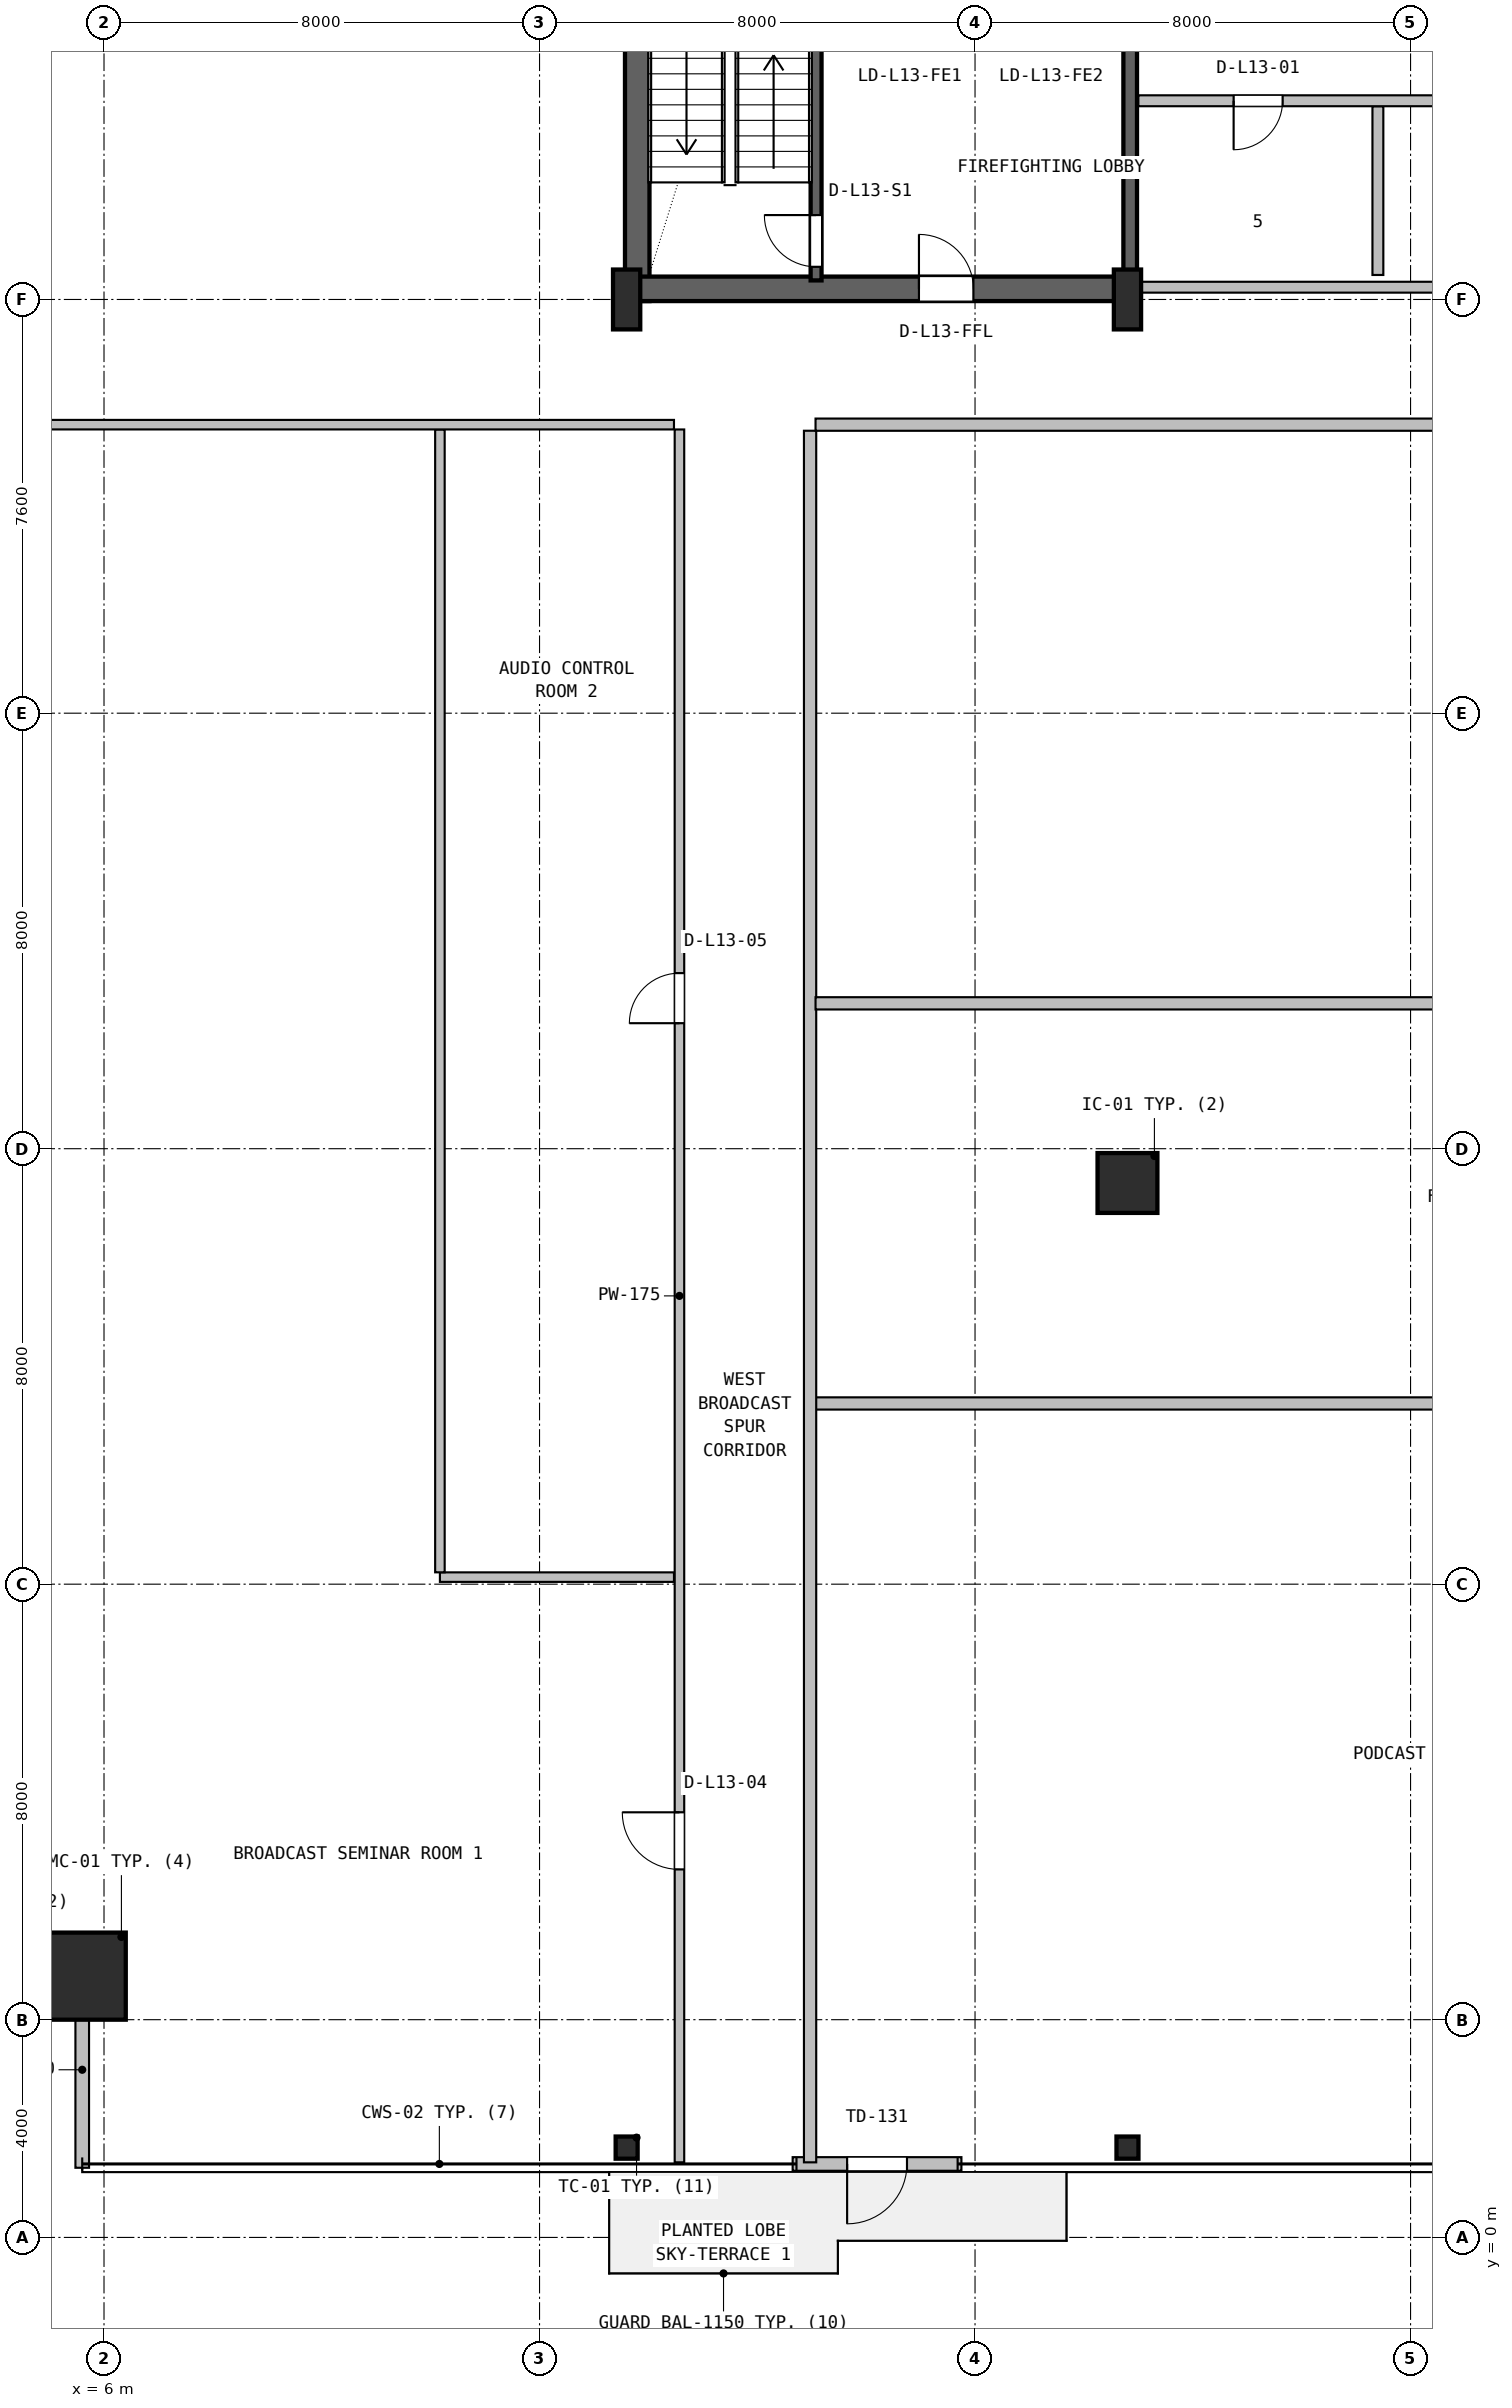
"""IFC4 building model, lengths in metres.
Left out: names, types, materials, properties, quantities, classifications, styles, units other than length and angle.
Written with IfcOpenShell. Run it as: python <this file> out.ifc"""

import sys

from ifc_helpers import new_model, si_unit, direction, frame, frame_2d, origin, origin_2d, place, context, subcontext, project, spatial, rectangle, hollow_rectangle, i_section, extrude, source, transform, mapped, element, fill, save


model = new_model("IFC4")
c1 = context("Model", 3, precision=1e-05, world=origin(), true_north=direction((0.0, 1.0)))
c2 = subcontext(c1, "Body", "Model", "MODEL_VIEW")
j1 = project(units=[si_unit("LENGTHUNIT", "METRE"), si_unit("PLANEANGLEUNIT", "RADIAN")], contexts=[c1])
p1 = place(None, origin())
s1 = spatial("IfcSite", under=j1, at=p1, CompositionType="ELEMENT")
p2 = place(p1, origin())
s2 = spatial("IfcBuilding", under=s1, at=p2, CompositionType="ELEMENT")
p3 = place(p2, frame((0.0, 0.0, 58.8)))
s3 = spatial("IfcBuildingStorey", under=s2, at=p3, CompositionType="ELEMENT", Elevation=58.8)
p4 = place(p3, frame((15.795, 35.57, 0.0), z_axis=(0.0, 0.0, 1.0), x_axis=(0.0, 1.0, 0.0)))
e1 = element("IfcWall", 1, at=p4, inside=s3, PredefinedType="SHEAR", context=c2, shape_type="SweptSolid", body=[
    extrude(rectangle(XDim=11.23, YDim=0.45, at=frame_2d((5.615, 0.0))), origin(), (0.0, 0.0, 1.0), 3.65),
])
p5 = place(p3, frame((15.57, 35.795, 0.0), z_axis=(0.0, 0.0, 1.0), x_axis=(1.0, 0.0, 0.0)))
e2 = element("IfcWall", 2, at=p5, inside=s3, PredefinedType="SHEAR", context=c2, shape_type="SweptSolid", body=[
    extrude(rectangle(XDim=9.23, YDim=0.45, at=frame_2d((4.615, 0.0))), origin(), (0.0, 0.0, 1.0), 3.65),
])
p6 = place(p5, frame((5.4, 0.0, 0.0)))
e3 = element("IfcOpeningElement", 3, at=p6, cuts=e2, PredefinedType="OPENING", context=c2, shape_type="SweptSolid", body=[
    extrude(rectangle(XDim=1.0, YDim=2.1, at=frame_2d((0.5, 1.05))), frame((0.0, 0.235, 0.0), z_axis=(0.0, -1.0, 0.0), x_axis=(1.0, 0.0, 0.0)), (0.0, 0.0, 1.0), 0.47),
])
m1 = source(origin(), c2, "Body", "SweptSolid", [
    extrude(i_section(OverallWidth=0.5, OverallDepth=1.1, WebThickness=0.018, FlangeThickness=0.032, FilletRadius=0.018, at=origin_2d()), origin(), (0.0, 0.0, 1.0), 3.9),
])
for number, where, z_axis, x_axis in (
    (4, (15.6, 35.6, 0.0), (0.0, 0.0, 1.0), (1.0, 0.0, 0.0)),
    (5, (24.8, 35.6, 0.0), (0.0, 0.0, 1.0), (1.0, 0.0, 0.0)),
):
    element("IfcColumn", number, at=place(p3, frame(where, z_axis=z_axis, x_axis=x_axis)), inside=s3, PredefinedType="COLUMN", context=c2, shape_type="MappedRepresentation", body=[
        mapped(m1, transform((0.0, 0.0, 0.0), x_axis=(1.0, 0.0, 0.0), y_axis=(0.0, 1.0, 0.0), z_axis=(0.0, 0.0, 1.0), scale=1.0)),
    ])
m2 = source(origin(), c2, "Body", "SweptSolid", [
    extrude(hollow_rectangle(XDim=1.6, YDim=1.6, WallThickness=0.06, at=origin_2d()), origin(), (0.0, 0.0, 1.0), 3.9),
])
p7 = place(p3, frame((5.6, 4.8, 0.0), z_axis=(0.0, 0.0, 1.0), x_axis=(1.0, 0.0, 0.0)))
e6 = element("IfcColumn", 6, at=p7, inside=s3, PredefinedType="COLUMN", context=c2, shape_type="MappedRepresentation", body=[
    mapped(m2, transform((0.0, 0.0, 0.0), x_axis=(1.0, 0.0, 0.0), y_axis=(0.0, 1.0, 0.0), z_axis=(0.0, 0.0, 1.0), scale=1.0)),
])
m3 = source(origin(), c2, "Body", "SweptSolid", [
    extrude(i_section(OverallWidth=0.404, OverallDepth=0.407, WebThickness=0.027, FlangeThickness=0.044, FilletRadius=0.018, at=origin_2d()), origin(), (0.0, 0.0, 1.0), 3.9),
])
for number, where, z_axis, x_axis in (
    (7, (15.6, 1.65, 0.0), (0.0, 0.0, 1.0), (1.0, 0.0, 0.0)),
    (8, (24.8, 1.65, 0.0), (0.0, 0.0, 1.0), (1.0, 0.0, 0.0)),
):
    element("IfcColumn", number, at=place(p3, frame(where, z_axis=z_axis, x_axis=x_axis)), inside=s3, PredefinedType="COLUMN", context=c2, shape_type="MappedRepresentation", body=[
        mapped(m3, transform((0.0, 0.0, 0.0), x_axis=(1.0, 0.0, 0.0), y_axis=(0.0, 1.0, 0.0), z_axis=(0.0, 0.0, 1.0), scale=1.0)),
    ])
m4 = source(origin(), c2, "Body", "SweptSolid", [
    extrude(rectangle(XDim=1.1, YDim=1.1, at=origin_2d()), origin(), (0.0, 0.0, 1.0), 3.9),
])
p8 = place(p3, frame((24.8, 19.37, 0.0), z_axis=(0.0, 0.0, 1.0), x_axis=(1.0, 0.0, 0.0)))
e9 = element("IfcColumn", 9, at=p8, inside=s3, PredefinedType="COLUMN", context=c2, shape_type="MappedRepresentation", body=[
    mapped(m4, transform((0.0, 0.0, 0.0), x_axis=(1.0, 0.0, 0.0), y_axis=(0.0, 1.0, 0.0), z_axis=(0.0, 0.0, 1.0), scale=1.0)),
])
p9 = place(p3, frame((18.65, 1.35, 0.0), z_axis=(0.0, 0.0, 1.0), x_axis=(1.0, 0.0, 0.0)))
e10 = element("IfcWall", 10, at=p9, inside=s3, PredefinedType="SOLIDWALL", context=c2, shape_type="SweptSolid", body=[
    extrude(rectangle(XDim=3.1, YDim=0.25, at=frame_2d((1.55, 0.0))), origin(), (0.0, 0.0, 1.0), 3.63),
])
p10 = place(p9, frame((1.0, 0.0, 0.0)))
e11 = element("IfcOpeningElement", 11, at=p10, cuts=e10, PredefinedType="OPENING", context=c2, shape_type="SweptSolid", body=[
    extrude(rectangle(XDim=1.1, YDim=2.15, at=frame_2d((0.55, 1.075))), frame((0.0, 0.135, 0.0), z_axis=(0.0, -1.0, 0.0), x_axis=(1.0, 0.0, 0.0)), (0.0, 0.0, 1.0), 0.27),
])
p11 = place(p3, frame((5.6, 1.28, 0.0), z_axis=(0.0, 0.0, 1.0), x_axis=(0.0, 1.0, 0.0)))
e12 = element("IfcWall", 12, at=p11, inside=s3, PredefinedType="SOLIDWALL", context=c2, shape_type="SweptSolid", body=[
    extrude(rectangle(XDim=3.6, YDim=0.25, at=frame_2d((1.8, 0.0))), origin(), (0.0, 0.0, 1.0), 3.208),
])
p12 = place(p3, frame((19.08, 35.95, 0.0), z_axis=(0.0, 0.0, 1.0), x_axis=(0.0, 1.0, 0.0)))
e13 = element("IfcWall", 13, at=p12, inside=s3, PredefinedType="SHEAR", context=c2, shape_type="SweptSolid", body=[
    extrude(rectangle(XDim=9.65, YDim=0.2, at=frame_2d((4.825, 0.0))), origin(), (0.0, 0.0, 1.0), 3.65),
])
p13 = place(p12, frame((0.25, 0.0, 0.0)))
e14 = element("IfcOpeningElement", 14, at=p13, cuts=e13, PredefinedType="OPENING", context=c2, shape_type="SweptSolid", body=[
    extrude(rectangle(XDim=0.95, YDim=2.1, at=frame_2d((0.475, 1.05))), frame((0.0, 0.11, 0.0), z_axis=(0.0, -1.0, 0.0), x_axis=(1.0, 0.0, 0.0)), (0.0, 0.0, 1.0), 0.22),
])
p14 = place(p3, frame((24.85, 36.05, 0.0), z_axis=(0.0, 0.0, 1.0), x_axis=(0.0, 1.0, 0.0)))
e15 = element("IfcWall", 15, at=p14, inside=s3, PredefinedType="SHEAR", context=c2, shape_type="SweptSolid", body=[
    extrude(rectangle(XDim=10.45, YDim=0.25, at=frame_2d((5.225, 0.0))), origin(), (0.0, 0.0, 1.0), 3.65),
])
p15 = place(p3, frame((25.0, 35.825, 0.0), z_axis=(0.0, 0.0, 1.0), x_axis=(1.0, 0.0, 0.0)))
e16 = element("IfcWall", 16, at=p15, inside=s3, PredefinedType="PLUMBINGWALL", context=c2, shape_type="SweptSolid", body=[
    extrude(rectangle(XDim=9.75, YDim=0.2, at=frame_2d((4.875, 0.0))), origin(), (0.0, 0.0, 1.0), 2.425),
])
p16 = place(p3, frame((29.4, 36.05, 0.0), z_axis=(0.0, 0.0, 1.0), x_axis=(0.0, 1.0, 0.0)))
e17 = element("IfcWall", 17, at=p16, inside=s3, PredefinedType="PLUMBINGWALL", context=c2, shape_type="SweptSolid", body=[
    extrude(rectangle(XDim=3.1, YDim=0.2, at=frame_2d((1.55, 0.0))), origin(), (0.0, 0.0, 1.0), 3.63),
])
p17 = place(p3, frame((25.0, 39.25, 0.0), z_axis=(0.0, 0.0, 1.0), x_axis=(1.0, 0.0, 0.0)))
e18 = element("IfcWall", 18, at=p17, inside=s3, PredefinedType="PLUMBINGWALL", context=c2, shape_type="SweptSolid", body=[
    extrude(rectangle(XDim=9.75, YDim=0.2, at=frame_2d((4.875, 0.0))), origin(), (0.0, 0.0, 1.0), 3.63),
])
p18 = place(p17, frame((1.75, 0.0, 0.0)))
e19 = element("IfcOpeningElement", 19, at=p18, cuts=e18, PredefinedType="OPENING", context=c2, shape_type="SweptSolid", body=[
    extrude(rectangle(XDim=0.9, YDim=2.06, at=frame_2d((0.45, 1.03))), frame((0.0, 0.11, 0.0), z_axis=(0.0, -1.0, 0.0), x_axis=(1.0, 0.0, 0.0)), (0.0, 0.0, 1.0), 0.22),
])
p19 = place(p17, frame((6.725, 0.0, 0.0)))
e20 = element("IfcOpeningElement", 20, at=p19, cuts=e18, PredefinedType="OPENING", context=c2, shape_type="SweptSolid", body=[
    extrude(rectangle(XDim=0.9, YDim=2.06, at=frame_2d((0.45, 1.03))), frame((0.0, 0.11, 0.0), z_axis=(0.0, -1.0, 0.0), x_axis=(1.0, 0.0, 0.0)), (0.0, 0.0, 1.0), 0.22),
])
p20 = place(p3, frame((16.57, 1.38, 0.0), z_axis=(0.0, 0.0, 1.0), x_axis=(0.0, 1.0, 0.0)))
e21 = element("IfcWall", 21, at=p20, inside=s3, PredefinedType="PARTITIONING", context=c2, shape_type="SweptSolid", body=[
    extrude(rectangle(XDim=31.832, YDim=0.175, at=frame_2d((15.916, 0.0))), origin(), (0.0, 0.0, 1.0), 3.208),
])
p21 = place(p20, frame((5.38, 0.0, 0.0)))
e22 = element("IfcOpeningElement", 22, at=p21, cuts=e21, PredefinedType="OPENING", context=c2, shape_type="SweptSolid", body=[
    extrude(rectangle(XDim=1.05, YDim=2.1, at=frame_2d((0.525, 1.05))), frame((0.0, 0.098, 0.0), z_axis=(0.0, -1.0, 0.0), x_axis=(1.0, 0.0, 0.0)), (0.0, 0.0, 1.0), 0.195),
])
p22 = place(p20, frame((20.925, 0.0, 0.0)))
e23 = element("IfcOpeningElement", 23, at=p22, cuts=e21, PredefinedType="OPENING", context=c2, shape_type="SweptSolid", body=[
    extrude(rectangle(XDim=0.92, YDim=2.08, at=frame_2d((0.46, 1.04))), frame((0.0, 0.098, 0.0), z_axis=(0.0, -1.0, 0.0), x_axis=(1.0, 0.0, 0.0)), (0.0, 0.0, 1.0), 0.195),
])
p23 = place(p3, frame((12.17, 12.13, 0.0), z_axis=(0.0, 0.0, 1.0), x_axis=(1.0, 0.0, 0.0)))
e24 = element("IfcWall", 24, at=p23, inside=s3, PredefinedType="PARTITIONING", context=c2, shape_type="SweptSolid", body=[
    extrude(rectangle(XDim=4.3, YDim=0.175, at=frame_2d((2.15, 0.0))), origin(), (0.0, 0.0, 1.0), 3.63),
])
p24 = place(p3, frame((12.17, 12.218, 0.0), z_axis=(0.0, 0.0, 1.0), x_axis=(0.0, 1.0, 0.0)))
e25 = element("IfcWall", 25, at=p24, inside=s3, PredefinedType="PARTITIONING", context=c2, shape_type="SweptSolid", body=[
    extrude(rectangle(XDim=20.994, YDim=0.175, at=frame_2d((10.497, 0.0))), origin(), (0.0, 0.0, 1.0), 3.322),
])
p25 = place(p3, frame((2.18, 33.3, 0.0), z_axis=(0.0, 0.0, 1.0), x_axis=(1.0, 0.0, 0.0)))
e26 = element("IfcWall", 26, at=p25, inside=s3, PredefinedType="PARTITIONING", context=c2, shape_type="SweptSolid", body=[
    extrude(rectangle(XDim=14.29, YDim=0.175, at=frame_2d((7.145, 0.0))), origin(), (0.0, 0.0, 1.0), 3.208),
])
p26 = place(p3, frame((19.07, 15.32, 0.0), z_axis=(0.0, 0.0, 1.0), x_axis=(1.0, 0.0, 0.0)))
e27 = element("IfcWall", 27, at=p26, inside=s3, PredefinedType="PARTITIONING", context=c2, shape_type="SweptSolid", body=[
    extrude(rectangle(XDim=26.29, YDim=0.225, at=frame_2d((13.145, 0.0))), origin(), (0.0, 0.0, 1.0), 2.852),
])
p27 = place(p3, frame((18.97, 1.38, 0.0), z_axis=(0.0, 0.0, 1.0), x_axis=(0.0, 1.0, 0.0)))
e28 = element("IfcWall", 28, at=p27, inside=s3, PredefinedType="PARTITIONING", context=c2, shape_type="SweptSolid", body=[
    extrude(rectangle(XDim=31.808, YDim=0.225, at=frame_2d((15.904, 0.0))), origin(), (0.0, 0.0, 1.0), 3.208),
])
p28 = place(p3, frame((19.07, 22.67, 0.0), z_axis=(0.0, 0.0, 1.0), x_axis=(1.0, 0.0, 0.0)))
e29 = element("IfcWall", 29, at=p28, inside=s3, PredefinedType="PARTITIONING", context=c2, shape_type="SweptSolid", body=[
    extrude(rectangle(XDim=26.29, YDim=0.225, at=frame_2d((13.145, 0.0))), origin(), (0.0, 0.0, 1.0), 2.852),
])
p29 = place(p3, frame((19.07, 33.3, 0.0), z_axis=(0.0, 0.0, 1.0), x_axis=(1.0, 0.0, 0.0)))
e30 = element("IfcWall", 30, at=p29, inside=s3, PredefinedType="PARTITIONING", context=c2, shape_type="SweptSolid", body=[
    extrude(rectangle(XDim=26.29, YDim=0.225, at=frame_2d((13.145, 0.0))), origin(), (0.0, 0.0, 1.0), 2.852),
])
p30 = place(p29, frame((12.445, 0.0, 0.0)))
e31 = element("IfcOpeningElement", 31, at=p30, cuts=e30, PredefinedType="OPENING", context=c2, shape_type="SweptSolid", body=[
    extrude(rectangle(XDim=1.4, YDim=2.12, at=frame_2d((0.7, 1.06))), frame((0.0, 0.123, 0.0), z_axis=(0.0, -1.0, 0.0), x_axis=(1.0, 0.0, 0.0)), (0.0, 0.0, 1.0), 0.245),
])
m5 = source(origin(), c2, "Body", "SweptSolid", [
    extrude(rectangle(XDim=1.1, YDim=2.15, at=frame_2d((0.55, 1.075))), frame((0.0, 0.025, 0.0), z_axis=(0.0, -1.0, 0.0), x_axis=(1.0, 0.0, 0.0)), (0.0, 0.0, 1.0), 0.05),
])
p31 = place(p10, frame((1.1, 0.0, 0.0), z_axis=(0.0, 0.0, 1.0), x_axis=(-1.0, 0.0, 0.0)))
e32 = element("IfcDoor", 32, at=p31, inside=s3, OperationType="SINGLE_SWING_LEFT", PredefinedType="DOOR", context=c2, shape_type="MappedRepresentation", body=[
    mapped(m5, transform((0.0, 0.0, 0.0), x_axis=(1.0, 0.0, 0.0), y_axis=(0.0, 1.0, 0.0), z_axis=(0.0, 0.0, 1.0), scale=1.0)),
])
fill(e11, e32)
m6 = source(origin(), c2, "Body", "SweptSolid", [
    extrude(rectangle(XDim=0.95, YDim=2.1, at=frame_2d((0.475, 1.05))), frame((0.0, 0.025, 0.0), z_axis=(0.0, -1.0, 0.0), x_axis=(1.0, 0.0, 0.0)), (0.0, 0.0, 1.0), 0.05),
])
p32 = place(p13, origin())
e33 = element("IfcDoor", 33, at=p32, inside=s3, OperationType="SINGLE_SWING_RIGHT", PredefinedType="DOOR", context=c2, shape_type="MappedRepresentation", body=[
    mapped(m6, transform((0.0, 0.0, 0.0), x_axis=(1.0, 0.0, 0.0), y_axis=(0.0, 1.0, 0.0), z_axis=(0.0, 0.0, 1.0), scale=1.0)),
])
fill(e14, e33)
m7 = source(origin(), c2, "Body", "SweptSolid", [
    extrude(rectangle(XDim=1.0, YDim=2.1, at=frame_2d((0.5, 1.05))), frame((0.0, 0.025, 0.0), z_axis=(0.0, -1.0, 0.0), x_axis=(1.0, 0.0, 0.0)), (0.0, 0.0, 1.0), 0.05),
])
p33 = place(p6, origin())
e34 = element("IfcDoor", 34, at=p33, inside=s3, OperationType="SINGLE_SWING_LEFT", PredefinedType="DOOR", context=c2, shape_type="MappedRepresentation", body=[
    mapped(m7, transform((0.0, 0.0, 0.0), x_axis=(1.0, 0.0, 0.0), y_axis=(0.0, 1.0, 0.0), z_axis=(0.0, 0.0, 1.0), scale=1.0)),
])
fill(e3, e34)
m8 = source(origin(), c2, "Body", "SweptSolid", [
    extrude(rectangle(XDim=0.9, YDim=2.06, at=frame_2d((0.45, 1.03))), frame((0.0, 0.025, 0.0), z_axis=(0.0, -1.0, 0.0), x_axis=(1.0, 0.0, 0.0)), (0.0, 0.0, 1.0), 0.05),
])
p34 = place(p18, frame((0.9, 0.0, 0.0), z_axis=(0.0, 0.0, 1.0), x_axis=(-1.0, 0.0, 0.0)))
e35 = element("IfcDoor", 35, at=p34, inside=s3, OperationType="SINGLE_SWING_LEFT", PredefinedType="DOOR", context=c2, shape_type="MappedRepresentation", body=[
    mapped(m8, transform((0.0, 0.0, 0.0), x_axis=(1.0, 0.0, 0.0), y_axis=(0.0, 1.0, 0.0), z_axis=(0.0, 0.0, 1.0), scale=1.0)),
])
fill(e19, e35)
m9 = source(origin(), c2, "Body", "SweptSolid", [
    extrude(rectangle(XDim=1.05, YDim=2.1, at=frame_2d((0.525, 1.05))), frame((0.0, 0.025, 0.0), z_axis=(0.0, -1.0, 0.0), x_axis=(1.0, 0.0, 0.0)), (0.0, 0.0, 1.0), 0.05),
])
p35 = place(p21, origin())
e36 = element("IfcDoor", 36, at=p35, inside=s3, OperationType="SINGLE_SWING_RIGHT", PredefinedType="DOOR", context=c2, shape_type="MappedRepresentation", body=[
    mapped(m9, transform((0.0, 0.0, 0.0), x_axis=(1.0, 0.0, 0.0), y_axis=(0.0, 1.0, 0.0), z_axis=(0.0, 0.0, 1.0), scale=1.0)),
])
fill(e22, e36)
m10 = source(origin(), c2, "Body", "SweptSolid", [
    extrude(rectangle(XDim=0.92, YDim=2.08, at=frame_2d((0.46, 1.04))), frame((0.0, 0.025, 0.0), z_axis=(0.0, -1.0, 0.0), x_axis=(1.0, 0.0, 0.0)), (0.0, 0.0, 1.0), 0.05),
])
p36 = place(p22, origin())
e37 = element("IfcDoor", 37, at=p36, inside=s3, OperationType="SINGLE_SWING_LEFT", PredefinedType="DOOR", context=c2, shape_type="MappedRepresentation", body=[
    mapped(m10, transform((0.0, 0.0, 0.0), x_axis=(1.0, 0.0, 0.0), y_axis=(0.0, 1.0, 0.0), z_axis=(0.0, 0.0, 1.0), scale=1.0)),
])
fill(e23, e37)
save(model, sys.argv[1])
